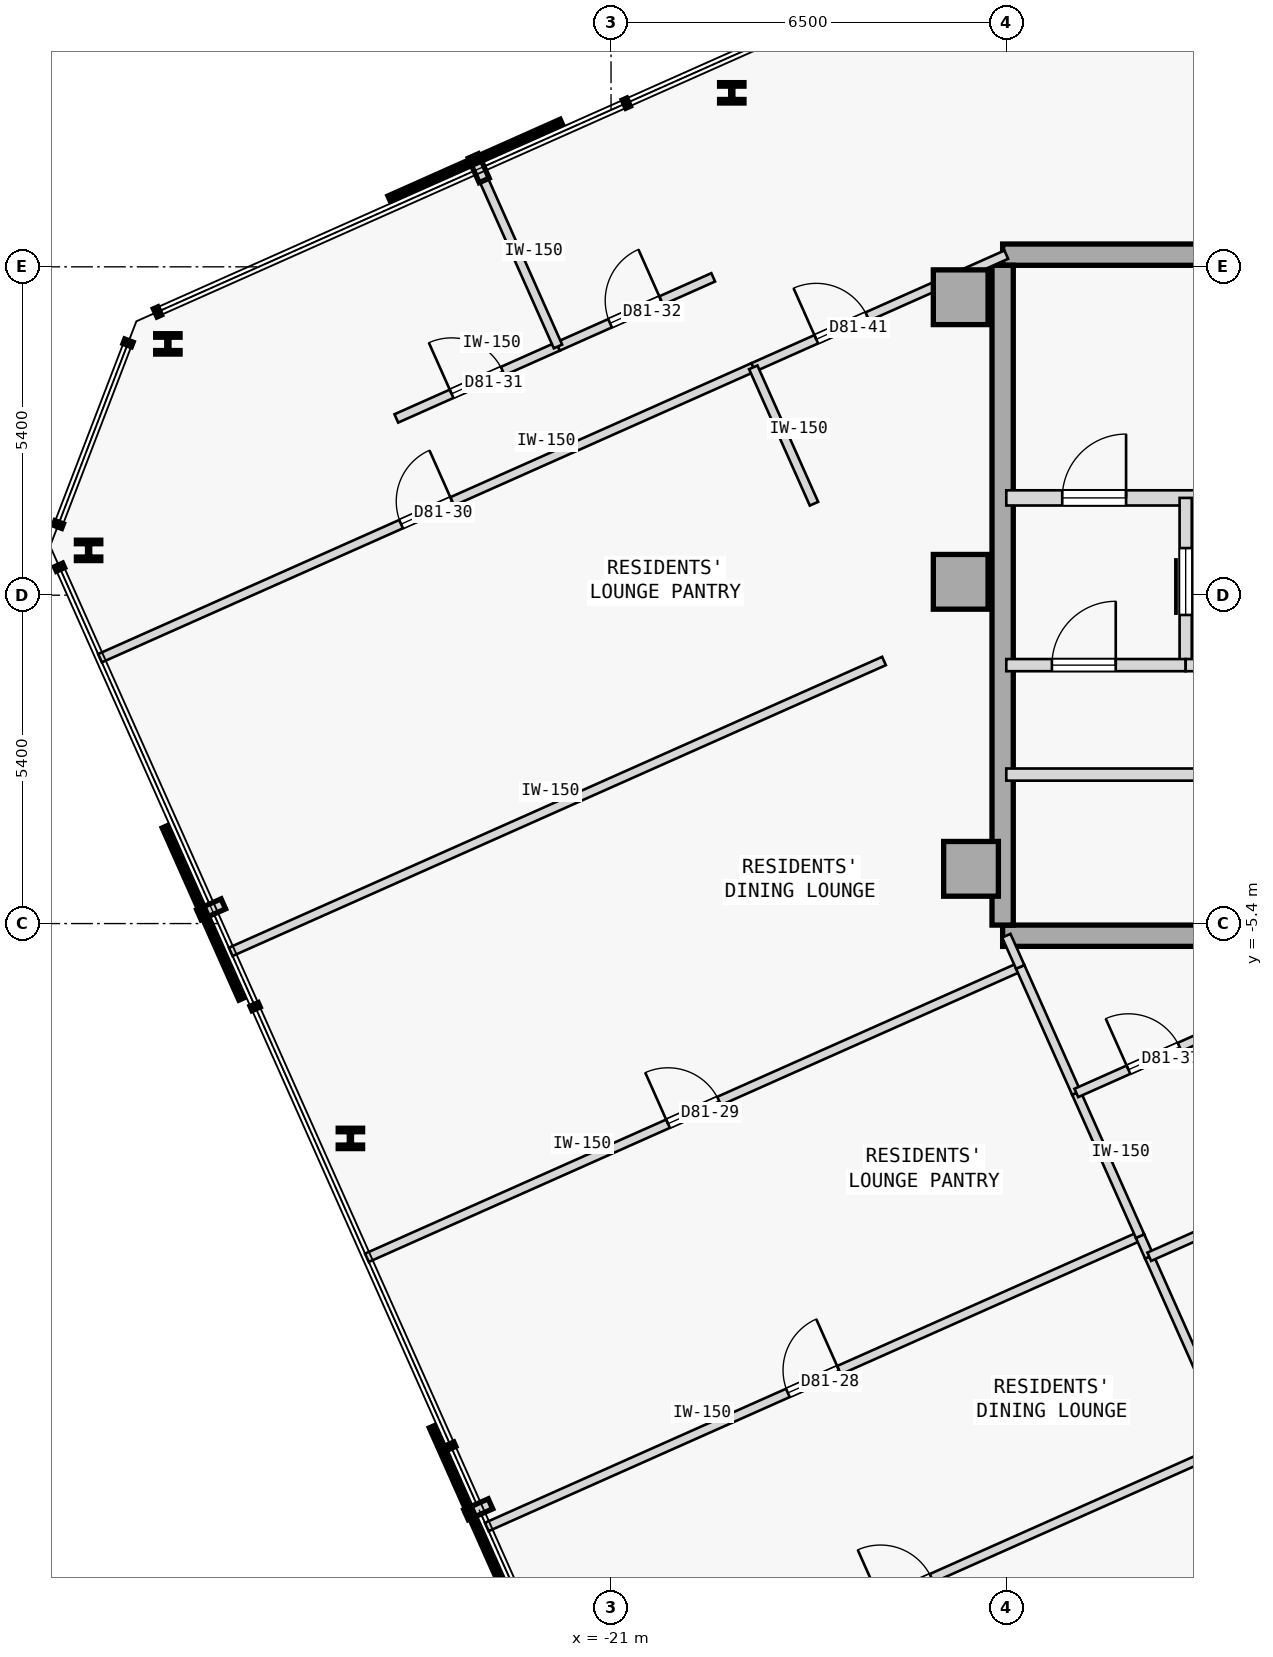
"""IFC4 building model, lengths in metres.
Left out: names, types, materials, properties, quantities, classifications, styles, units other than length and angle.
Written with IfcOpenShell. Run it as: python <this file> out.ifc"""

import sys

from ifc_helpers import new_model, si_unit, direction, frame, frame_2d, origin, origin_2d, place, context, subcontext, project, spatial, rectangle, i_section, extrude, element, fill, save


model = new_model("IFC4")
c1 = context("Model", 3, precision=1e-05, world=origin(), true_north=direction((0.0, 1.0)))
c2 = subcontext(c1, "Body", "Model", "MODEL_VIEW")
j1 = project(units=[si_unit("LENGTHUNIT", "METRE"), si_unit("PLANEANGLEUNIT", "RADIAN")], contexts=[c1])
p1 = place(None, origin())
s1 = spatial("IfcSite", under=j1, at=p1, CompositionType="ELEMENT")
p2 = place(p1, origin())
s2 = spatial("IfcBuilding", under=s1, at=p2, CompositionType="ELEMENT")
p3 = place(p2, frame((0.0, 0.0, 302.0)))
s3 = spatial("IfcBuildingStorey", under=s2, at=p3, CompositionType="ELEMENT", Elevation=302.0)
for number, where, z_axis, x_axis in (
    (1, (-15.25, 4.9, 0.0), (0.0, 0.0, 1.0), (1.0, 0.0, 0.0)),
    (2, (-15.25, 0.22, 0.0), (0.0, 0.0, 1.0), (1.0, 0.0, 0.0)),
    (3, (-15.08, -4.5, 0.0), (0.0, 0.0, 1.0), (1.0, 0.0, 0.0)),
):
    element("IfcColumn", number, at=place(p3, frame(where, z_axis=z_axis, x_axis=x_axis)), inside=s3, PredefinedType="COLUMN", context=c2, shape_type="SweptSolid", body=[
        extrude(rectangle(XDim=0.9, YDim=0.9, at=origin_2d()), origin(), (0.0, 0.0, 1.0), 3.55),
    ])
p4 = place(p3, frame((-14.56, 5.6, 0.0), z_axis=(0.0, 0.0, 1.0), x_axis=(1.0, 0.0, 0.0)))
e4 = element("IfcWall", 4, at=p4, inside=s3, PredefinedType="SHEAR", context=c2, shape_type="SweptSolid", body=[
    extrude(rectangle(XDim=11.41, YDim=0.35, at=frame_2d((5.705, 0.0))), origin(), (0.0, 0.0, 1.0), 3.145),
])
p5 = place(p3, frame((-14.56, -5.6, 0.0), z_axis=(0.0, 0.0, 1.0), x_axis=(1.0, 0.0, 0.0)))
e5 = element("IfcWall", 5, at=p5, inside=s3, PredefinedType="SHEAR", context=c2, shape_type="SweptSolid", body=[
    extrude(rectangle(XDim=10.86, YDim=0.35, at=frame_2d((5.43, 0.0))), origin(), (0.0, 0.0, 1.0), 3.145),
])
p6 = place(p3, frame((-14.56, -5.425, 0.0), z_axis=(0.0, 0.0, 1.0), x_axis=(0.0, 1.0, 0.0)))
e6 = element("IfcWall", 6, at=p6, inside=s3, PredefinedType="SHEAR", context=c2, shape_type="SweptSolid", body=[
    extrude(rectangle(XDim=10.85, YDim=0.35, at=frame_2d((5.425, 0.0))), origin(), (0.0, 0.0, 1.0), 3.145),
])
for number, where, z_axis, x_axis in (
    (7, (-19.015, 8.262, 0.0), (0.0, 0.0, 1.0), (1.0, 0.0, 0.0)),
    (8, (-28.288, 4.133, 0.0), (0.0, 0.0, 1.0), (1.0, 0.0, 0.0)),
    (9, (-29.592, 0.737, 0.0), (0.0, 0.0, 1.0), (1.0, 0.0, 0.0)),
    (10, (-25.286, -8.933, 0.0), (0.0, 0.0, 1.0), (1.0, 0.0, 0.0)),
):
    element("IfcColumn", number, at=place(p3, frame(where, z_axis=z_axis, x_axis=x_axis)), inside=s3, PredefinedType="COLUMN", context=c2, shape_type="SweptSolid", body=[
        extrude(i_section(OverallWidth=0.401, OverallDepth=0.335, WebThickness=0.036, FlangeThickness=0.058, FilletRadius=0.015, at=origin_2d()), origin(), (0.0, 0.0, 1.0), 3.55),
    ])
p7 = place(p3, frame((-14.5, 1.6, 0.0), z_axis=(0.0, 0.0, 1.0), x_axis=(1.0, 0.0, 0.0)))
e11 = element("IfcWall", 11, at=p7, inside=s3, PredefinedType="STANDARD", context=c2, shape_type="SweptSolid", body=[
    extrude(rectangle(XDim=3.6, YDim=0.25, at=frame_2d((1.8, 0.0))), origin(), (0.0, 0.0, 1.0), 3.145),
])
p8 = place(p7, frame((0.92, 0.0, 0.0)))
e12 = element("IfcOpeningElement", 12, at=p8, cuts=e11, PredefinedType="OPENING", context=c2, shape_type="SweptSolid", body=[
    extrude(rectangle(XDim=1.05, YDim=2.15, at=frame_2d((0.525, 1.075))), frame((0.0, 0.135, 0.0), z_axis=(0.0, -1.0, 0.0), x_axis=(1.0, 0.0, 0.0)), (0.0, 0.0, 1.0), 0.27),
])
p9 = place(p3, frame((-11.55, -1.15, 0.0), z_axis=(0.0, 0.0, 1.0), x_axis=(0.0, 1.0, 0.0)))
e13 = element("IfcWall", 13, at=p9, inside=s3, PredefinedType="STANDARD", context=c2, shape_type="SweptSolid", body=[
    extrude(rectangle(XDim=2.75, YDim=0.2, at=frame_2d((1.375, 0.0))), origin(), (0.0, 0.0, 1.0), 3.145),
])
p10 = place(p9, frame((0.825, 0.0, 0.0)))
e14 = element("IfcOpeningElement", 14, at=p10, cuts=e13, PredefinedType="OPENING", context=c2, shape_type="SweptSolid", body=[
    extrude(rectangle(XDim=1.1, YDim=2.15, at=frame_2d((0.55, 1.075))), frame((0.0, 0.11, 0.0), z_axis=(0.0, -1.0, 0.0), x_axis=(1.0, 0.0, 0.0)), (0.0, 0.0, 1.0), 0.22),
])
p11 = place(p3, frame((-14.5, -1.15, 0.0), z_axis=(0.0, 0.0, 1.0), x_axis=(1.0, 0.0, 0.0)))
e15 = element("IfcWall", 15, at=p11, inside=s3, PredefinedType="STANDARD", context=c2, shape_type="SweptSolid", body=[
    extrude(rectangle(XDim=2.95, YDim=0.2, at=frame_2d((1.475, 0.0))), origin(), (0.0, 0.0, 1.0), 3.145),
])
p12 = place(p11, frame((0.75, 0.0, 0.0)))
e16 = element("IfcOpeningElement", 16, at=p12, cuts=e15, PredefinedType="OPENING", context=c2, shape_type="SweptSolid", body=[
    extrude(rectangle(XDim=1.05, YDim=2.18, at=frame_2d((0.525, 1.09))), frame((0.0, 0.11, 0.0), z_axis=(0.0, -1.0, 0.0), x_axis=(1.0, 0.0, 0.0)), (0.0, 0.0, 1.0), 0.22),
])
p13 = place(p3, frame((-11.55, -1.15, 0.0), z_axis=(0.0, 0.0, 1.0), x_axis=(1.0, 0.0, 0.0)))
e17 = element("IfcWall", 17, at=p13, inside=s3, PredefinedType="STANDARD", context=c2, shape_type="SweptSolid", body=[
    extrude(rectangle(XDim=2.2, YDim=0.2, at=frame_2d((1.1, 0.0))), origin(), (0.0, 0.0, 1.0), 3.145),
])
p14 = place(p3, frame((-14.5, -2.95, 0.0), z_axis=(0.0, 0.0, 1.0), x_axis=(1.0, 0.0, 0.0)))
e18 = element("IfcWall", 18, at=p14, inside=s3, PredefinedType="STANDARD", context=c2, shape_type="SweptSolid", body=[
    extrude(rectangle(XDim=10.8, YDim=0.2, at=frame_2d((5.4, 0.0))), origin(), (0.0, 0.0, 1.0), 3.145),
])
p15 = place(p14, frame((9.17, 0.0, 0.0)))
e19 = element("IfcOpeningElement", 19, at=p15, cuts=e18, PredefinedType="OPENING", context=c2, shape_type="SweptSolid", body=[
    extrude(rectangle(XDim=1.1, YDim=2.15, at=frame_2d((0.55, 1.075))), frame((0.0, 0.11, 0.0), z_axis=(0.0, -1.0, 0.0), x_axis=(1.0, 0.0, 0.0)), (0.0, 0.0, 1.0), 0.22),
])
p16 = place(p14, frame((3.86, 0.0, 0.0)))
e20 = element("IfcOpeningElement", 20, at=p16, cuts=e18, PredefinedType="OPENING", context=c2, shape_type="SweptSolid", body=[
    extrude(rectangle(XDim=0.92, YDim=2.04, at=frame_2d((0.46, 1.02))), frame((0.0, 0.11, 0.0), z_axis=(0.0, -1.0, 0.0), x_axis=(1.0, 0.0, 0.0)), (0.0, 0.0, 1.0), 0.22),
])
p17 = place(p3, frame((-29.404, -1.036, 0.0), z_axis=(0.0, 0.0, 1.0), x_axis=(0.913544247064, 0.406739362069, 0.0)))
e21 = element("IfcWall", 21, at=p17, inside=s3, PredefinedType="PARTITIONING", context=c2, shape_type="SweptSolid", body=[
    extrude(rectangle(XDim=11.76, YDim=0.15, at=frame_2d((5.88, 0.0))), origin(), (0.0, 0.0, 1.0), 3.145),
])
p18 = place(p17, frame((5.42, 0.0, 0.0)))
e22 = element("IfcOpeningElement", 22, at=p18, cuts=e21, PredefinedType="OPENING", context=c2, shape_type="SweptSolid", body=[
    extrude(rectangle(XDim=0.92, YDim=2.04, at=frame_2d((0.46, 1.02))), frame((0.0, 0.085, 0.0), z_axis=(0.0, -1.0, 0.0), x_axis=(1.0, 0.0, 0.0)), (0.0, 0.0, 1.0), 0.17),
])
p19 = place(p3, frame((-24.531, 2.907, 0.0), z_axis=(0.0, 0.0, 1.0), x_axis=(0.913531130744, 0.406768820292, 0.0)))
e23 = element("IfcWall", 23, at=p19, inside=s3, PredefinedType="PARTITIONING", context=c2, shape_type="SweptSolid", body=[
    extrude(rectangle(XDim=2.91, YDim=0.15, at=frame_2d((1.455, 0.0))), origin(), (0.0, 0.0, 1.0), 3.145),
])
p20 = place(p19, frame((0.995, 0.0, 0.0)))
e24 = element("IfcOpeningElement", 24, at=p20, cuts=e23, PredefinedType="OPENING", context=c2, shape_type="SweptSolid", body=[
    extrude(rectangle(XDim=0.92, YDim=2.04, at=frame_2d((0.46, 1.02))), frame((0.0, 0.085, 0.0), z_axis=(0.0, -1.0, 0.0), x_axis=(1.0, 0.0, 0.0)), (0.0, 0.0, 1.0), 0.17),
])
p21 = place(p3, frame((-21.872, 4.091, 0.0), z_axis=(0.0, 0.0, 1.0), x_axis=(0.913559116966, 0.406705962346, 0.0)))
e25 = element("IfcWall", 25, at=p21, inside=s3, PredefinedType="PARTITIONING", context=c2, shape_type="SweptSolid", body=[
    extrude(rectangle(XDim=2.794, YDim=0.15, at=frame_2d((1.397, 0.0))), origin(), (0.0, 0.0, 1.0), 3.145),
])
p22 = place(p21, frame((0.937, 0.0, 0.0)))
e26 = element("IfcOpeningElement", 26, at=p22, cuts=e25, PredefinedType="OPENING", context=c2, shape_type="SweptSolid", body=[
    extrude(rectangle(XDim=0.92, YDim=2.04, at=frame_2d((0.46, 1.02))), frame((0.0, 0.085, 0.0), z_axis=(0.0, -1.0, 0.0), x_axis=(1.0, 0.0, 0.0)), (0.0, 0.0, 1.0), 0.17),
])
p23 = place(p3, frame((-18.661, 3.747, 0.0), z_axis=(0.0, 0.0, 1.0), x_axis=(0.913535055583, 0.40676000568, 0.0)))
e27 = element("IfcWall", 27, at=p23, inside=s3, PredefinedType="PARTITIONING", context=c2, shape_type="SweptSolid", body=[
    extrude(rectangle(XDim=4.555, YDim=0.15, at=frame_2d((2.277, 0.0))), origin(), (0.0, 0.0, 1.0), 3.145),
])
p24 = place(p23, frame((1.134, 0.0, 0.0)))
e28 = element("IfcOpeningElement", 28, at=p24, cuts=e27, PredefinedType="OPENING", context=c2, shape_type="SweptSolid", body=[
    extrude(rectangle(XDim=0.92, YDim=2.04, at=frame_2d((0.46, 1.02))), frame((0.0, 0.085, 0.0), z_axis=(0.0, -1.0, 0.0), x_axis=(1.0, 0.0, 0.0)), (0.0, 0.0, 1.0), 0.17),
])
p25 = place(p3, frame((-21.52, -18.744, 0.0), z_axis=(0.0, 0.0, 1.0), x_axis=(0.913539967617, 0.406748973651, 0.0)))
e29 = element("IfcWall", 29, at=p25, inside=s3, PredefinedType="PARTITIONING", context=c2, shape_type="SweptSolid", body=[
    extrude(rectangle(XDim=11.76, YDim=0.15, at=frame_2d((5.88, 0.0))), origin(), (0.0, 0.0, 1.0), 3.145),
])
p26 = place(p25, frame((5.42, 0.0, 0.0)))
e30 = element("IfcOpeningElement", 30, at=p26, cuts=e29, PredefinedType="OPENING", context=c2, shape_type="SweptSolid", body=[
    extrude(rectangle(XDim=0.92, YDim=2.04, at=frame_2d((0.46, 1.02))), frame((0.0, 0.085, 0.0), z_axis=(0.0, -1.0, 0.0), x_axis=(1.0, 0.0, 0.0)), (0.0, 0.0, 1.0), 0.17),
])
p27 = place(p3, frame((-23.043, -15.323, 0.0), z_axis=(0.0, 0.0, 1.0), x_axis=(0.913547681516, 0.406731648137, 0.0)))
e31 = element("IfcWall", 31, at=p27, inside=s3, PredefinedType="PARTITIONING", context=c2, shape_type="SweptSolid", body=[
    extrude(rectangle(XDim=11.76, YDim=0.15, at=frame_2d((5.88, 0.0))), origin(), (0.0, 0.0, 1.0), 3.145),
])
p28 = place(p27, frame((5.42, 0.0, 0.0)))
e32 = element("IfcOpeningElement", 32, at=p28, cuts=e31, PredefinedType="OPENING", context=c2, shape_type="SweptSolid", body=[
    extrude(rectangle(XDim=0.92, YDim=2.04, at=frame_2d((0.46, 1.02))), frame((0.0, 0.085, 0.0), z_axis=(0.0, -1.0, 0.0), x_axis=(1.0, 0.0, 0.0)), (0.0, 0.0, 1.0), 0.17),
])
p29 = place(p3, frame((-11.093, -13.25, 0.0), z_axis=(0.0, 0.0, 1.0), x_axis=(-0.406723252866, 0.91355141923, 0.0)))
e33 = element("IfcWall", 33, at=p29, inside=s3, PredefinedType="PARTITIONING", context=c2, shape_type="SweptSolid", body=[
    extrude(rectangle(XDim=2.595, YDim=0.15, at=frame_2d((1.297, 0.0))), origin(), (0.0, 0.0, 1.0), 3.145),
])
p30 = place(p3, frame((-12.149, -10.88, 0.0), z_axis=(0.0, 0.0, 1.0), x_axis=(-0.406868995548, 0.913486519037, 0.0)))
e34 = element("IfcWall", 34, at=p30, inside=s3, PredefinedType="PARTITIONING", context=c2, shape_type="SweptSolid", body=[
    extrude(rectangle(XDim=0.372, YDim=0.15, at=frame_2d((0.186, 0.0))), origin(), (0.0, 0.0, 1.0), 3.145),
])
p31 = place(p3, frame((-25.014, -10.896, 0.0), z_axis=(0.0, 0.0, 1.0), x_axis=(0.913544247064, 0.406739362069, 0.0)))
e35 = element("IfcWall", 35, at=p31, inside=s3, PredefinedType="PARTITIONING", context=c2, shape_type="SweptSolid", body=[
    extrude(rectangle(XDim=11.76, YDim=0.15, at=frame_2d((5.88, 0.0))), origin(), (0.0, 0.0, 1.0), 3.145),
])
p32 = place(p31, frame((5.42, 0.0, 0.0)))
e36 = element("IfcOpeningElement", 36, at=p32, cuts=e35, PredefinedType="OPENING", context=c2, shape_type="SweptSolid", body=[
    extrude(rectangle(XDim=0.92, YDim=2.04, at=frame_2d((0.46, 1.02))), frame((0.0, 0.085, 0.0), z_axis=(0.0, -1.0, 0.0), x_axis=(1.0, 0.0, 0.0)), (0.0, 0.0, 1.0), 0.17),
])
p33 = place(p3, frame((-12.3, -10.54, 0.0), z_axis=(0.0, 0.0, 1.0), x_axis=(-0.406788806475, 0.913522231216, 0.0)))
e37 = element("IfcWall", 37, at=p33, inside=s3, PredefinedType="PARTITIONING", context=c2, shape_type="SweptSolid", body=[
    extrude(rectangle(XDim=2.577, YDim=0.15, at=frame_2d((1.289, 0.0))), origin(), (0.0, 0.0, 1.0), 3.145),
])
p34 = place(p3, frame((-13.348, -8.186, 0.0), z_axis=(0.0, 0.0, 1.0), x_axis=(-0.40673740295, 0.913545119324, 0.0)))
e38 = element("IfcWall", 38, at=p34, inside=s3, PredefinedType="PARTITIONING", context=c2, shape_type="SweptSolid", body=[
    extrude(rectangle(XDim=2.269, YDim=0.15, at=frame_2d((1.134, 0.0))), origin(), (0.0, 0.0, 1.0), 3.145),
])
p35 = place(p3, frame((-27.254, -5.865, 0.0), z_axis=(0.0, 0.0, 1.0), x_axis=(0.913547681516, 0.406731648137, 0.0)))
e39 = element("IfcWall", 39, at=p35, inside=s3, PredefinedType="PARTITIONING", context=c2, shape_type="SweptSolid", body=[
    extrude(rectangle(XDim=11.76, YDim=0.15, at=frame_2d((5.88, 0.0))), origin(), (0.0, 0.0, 1.0), 3.145),
])
p36 = place(p3, frame((-14.271, -6.113, 0.0), z_axis=(0.0, 0.0, 1.0), x_axis=(-0.406622099206, 0.913596447255, 0.0)))
e40 = element("IfcWall", 40, at=p36, inside=s3, PredefinedType="PARTITIONING", context=c2, shape_type="SweptSolid", body=[
    extrude(rectangle(XDim=0.562, YDim=0.15, at=frame_2d((0.281, 0.0))), origin(), (0.0, 0.0, 1.0), 3.145),
])
p37 = place(p3, frame((-17.663, 1.504, 0.0), z_axis=(0.0, 0.0, 1.0), x_axis=(-0.406747374275, 0.913540679729, 0.0)))
e41 = element("IfcWall", 41, at=p37, inside=s3, PredefinedType="PARTITIONING", context=c2, shape_type="SweptSolid", body=[
    extrude(rectangle(XDim=2.455, YDim=0.15, at=frame_2d((1.228, 0.0))), origin(), (0.0, 0.0, 1.0), 3.145),
])
p38 = place(p3, frame((-21.872, 4.091, 0.0), z_axis=(0.0, 0.0, 1.0), x_axis=(-0.406761717745, 0.913534293268, 0.0)))
e42 = element("IfcWall", 42, at=p38, inside=s3, PredefinedType="PARTITIONING", context=c2, shape_type="SweptSolid", body=[
    extrude(rectangle(XDim=3.198, YDim=0.15, at=frame_2d((1.599, 0.0))), origin(), (0.0, 0.0, 1.0), 3.145),
])
p39 = place(p3, frame((-12.149, -10.88, 0.0), z_axis=(0.0, 0.0, 1.0), x_axis=(0.913542450291, 0.406743397631, 0.0)))
e43 = element("IfcWall", 43, at=p39, inside=s3, PredefinedType="PARTITIONING", context=c2, shape_type="SweptSolid", body=[
    extrude(rectangle(XDim=9.248, YDim=0.15, at=frame_2d((4.624, 0.0))), origin(), (0.0, 0.0, 1.0), 3.145),
])
p40 = place(p3, frame((-13.348, -8.186, 0.0), z_axis=(0.0, 0.0, 1.0), x_axis=(0.913551673432, 0.406722681896, 0.0)))
e44 = element("IfcWall", 44, at=p40, inside=s3, PredefinedType="PARTITIONING", context=c2, shape_type="SweptSolid", body=[
    extrude(rectangle(XDim=6.358, YDim=0.15, at=frame_2d((3.179, 0.0))), origin(), (0.0, 0.0, 1.0), 3.145),
])
p41 = place(p40, frame((0.939, 0.0, 0.0)))
e45 = element("IfcOpeningElement", 45, at=p41, cuts=e44, PredefinedType="OPENING", context=c2, shape_type="SweptSolid", body=[
    extrude(rectangle(XDim=0.92, YDim=2.04, at=frame_2d((0.46, 1.02))), frame((0.0, 0.085, 0.0), z_axis=(0.0, -1.0, 0.0), x_axis=(1.0, 0.0, 0.0)), (0.0, 0.0, 1.0), 0.17),
])
p42 = place(p8, origin())
e46 = element("IfcDoor", 46, at=p42, inside=s3, OperationType="SINGLE_SWING_RIGHT", PredefinedType="DOOR", context=c2, shape_type="SweptSolid", body=[
    extrude(rectangle(XDim=1.05, YDim=2.15, at=frame_2d((0.525, 1.075))), frame((0.0, 0.025, 0.0), z_axis=(0.0, -1.0, 0.0), x_axis=(1.0, 0.0, 0.0)), (0.0, 0.0, 1.0), 0.05),
])
fill(e12, e46)
p43 = place(p12, origin())
e47 = element("IfcDoor", 47, at=p43, inside=s3, OperationType="SINGLE_SWING_RIGHT", PredefinedType="DOOR", context=c2, shape_type="SweptSolid", body=[
    extrude(rectangle(XDim=1.05, YDim=2.18, at=frame_2d((0.525, 1.09))), frame((0.0, 0.025, 0.0), z_axis=(0.0, -1.0, 0.0), x_axis=(1.0, 0.0, 0.0)), (0.0, 0.0, 1.0), 0.05),
])
fill(e16, e47)
p44 = place(p10, origin())
e48 = element("IfcDoor", 48, at=p44, inside=s3, OperationType="SLIDING_TO_RIGHT", PredefinedType="DOOR", context=c2, shape_type="SweptSolid", body=[
    extrude(rectangle(XDim=1.1, YDim=2.15, at=frame_2d((0.55, 1.075))), frame((0.0, 0.025, 0.0), z_axis=(0.0, -1.0, 0.0), x_axis=(1.0, 0.0, 0.0)), (0.0, 0.0, 1.0), 0.05),
])
fill(e14, e48)
p45 = place(p26, origin())
e49 = element("IfcDoor", 49, at=p45, inside=s3, OperationType="SINGLE_SWING_LEFT", PredefinedType="DOOR", context=c2, shape_type="SweptSolid", body=[
    extrude(rectangle(XDim=0.92, YDim=2.04, at=frame_2d((0.46, 1.02))), frame((0.0, 0.025, 0.0), z_axis=(0.0, -1.0, 0.0), x_axis=(1.0, 0.0, 0.0)), (0.0, 0.0, 1.0), 0.05),
])
fill(e30, e49)
p46 = place(p28, origin())
e50 = element("IfcDoor", 50, at=p46, inside=s3, OperationType="SINGLE_SWING_RIGHT", PredefinedType="DOOR", context=c2, shape_type="SweptSolid", body=[
    extrude(rectangle(XDim=0.92, YDim=2.04, at=frame_2d((0.46, 1.02))), frame((0.0, 0.025, 0.0), z_axis=(0.0, -1.0, 0.0), x_axis=(1.0, 0.0, 0.0)), (0.0, 0.0, 1.0), 0.05),
])
fill(e32, e50)
p47 = place(p32, origin())
e51 = element("IfcDoor", 51, at=p47, inside=s3, OperationType="SINGLE_SWING_LEFT", PredefinedType="DOOR", context=c2, shape_type="SweptSolid", body=[
    extrude(rectangle(XDim=0.92, YDim=2.04, at=frame_2d((0.46, 1.02))), frame((0.0, 0.025, 0.0), z_axis=(0.0, -1.0, 0.0), x_axis=(1.0, 0.0, 0.0)), (0.0, 0.0, 1.0), 0.05),
])
fill(e36, e51)
p48 = place(p18, origin())
e52 = element("IfcDoor", 52, at=p48, inside=s3, OperationType="SINGLE_SWING_RIGHT", PredefinedType="DOOR", context=c2, shape_type="SweptSolid", body=[
    extrude(rectangle(XDim=0.92, YDim=2.04, at=frame_2d((0.46, 1.02))), frame((0.0, 0.025, 0.0), z_axis=(0.0, -1.0, 0.0), x_axis=(1.0, 0.0, 0.0)), (0.0, 0.0, 1.0), 0.05),
])
fill(e22, e52)
p49 = place(p20, origin())
e53 = element("IfcDoor", 53, at=p49, inside=s3, OperationType="SINGLE_SWING_LEFT", PredefinedType="DOOR", context=c2, shape_type="SweptSolid", body=[
    extrude(rectangle(XDim=0.92, YDim=2.04, at=frame_2d((0.46, 1.02))), frame((0.0, 0.025, 0.0), z_axis=(0.0, -1.0, 0.0), x_axis=(1.0, 0.0, 0.0)), (0.0, 0.0, 1.0), 0.05),
])
fill(e24, e53)
p50 = place(p22, origin())
e54 = element("IfcDoor", 54, at=p50, inside=s3, OperationType="SINGLE_SWING_RIGHT", PredefinedType="DOOR", context=c2, shape_type="SweptSolid", body=[
    extrude(rectangle(XDim=0.92, YDim=2.04, at=frame_2d((0.46, 1.02))), frame((0.0, 0.025, 0.0), z_axis=(0.0, -1.0, 0.0), x_axis=(1.0, 0.0, 0.0)), (0.0, 0.0, 1.0), 0.05),
])
fill(e26, e54)
p51 = place(p41, origin())
e55 = element("IfcDoor", 55, at=p51, inside=s3, OperationType="SINGLE_SWING_LEFT", PredefinedType="DOOR", context=c2, shape_type="SweptSolid", body=[
    extrude(rectangle(XDim=0.92, YDim=2.04, at=frame_2d((0.46, 1.02))), frame((0.0, 0.025, 0.0), z_axis=(0.0, -1.0, 0.0), x_axis=(1.0, 0.0, 0.0)), (0.0, 0.0, 1.0), 0.05),
])
fill(e45, e55)
p52 = place(p24, origin())
e56 = element("IfcDoor", 56, at=p52, inside=s3, OperationType="SINGLE_SWING_LEFT", PredefinedType="DOOR", context=c2, shape_type="SweptSolid", body=[
    extrude(rectangle(XDim=0.92, YDim=2.04, at=frame_2d((0.46, 1.02))), frame((0.0, 0.025, 0.0), z_axis=(0.0, -1.0, 0.0), x_axis=(1.0, 0.0, 0.0)), (0.0, 0.0, 1.0), 0.05),
])
fill(e28, e56)
save(model, sys.argv[1])
